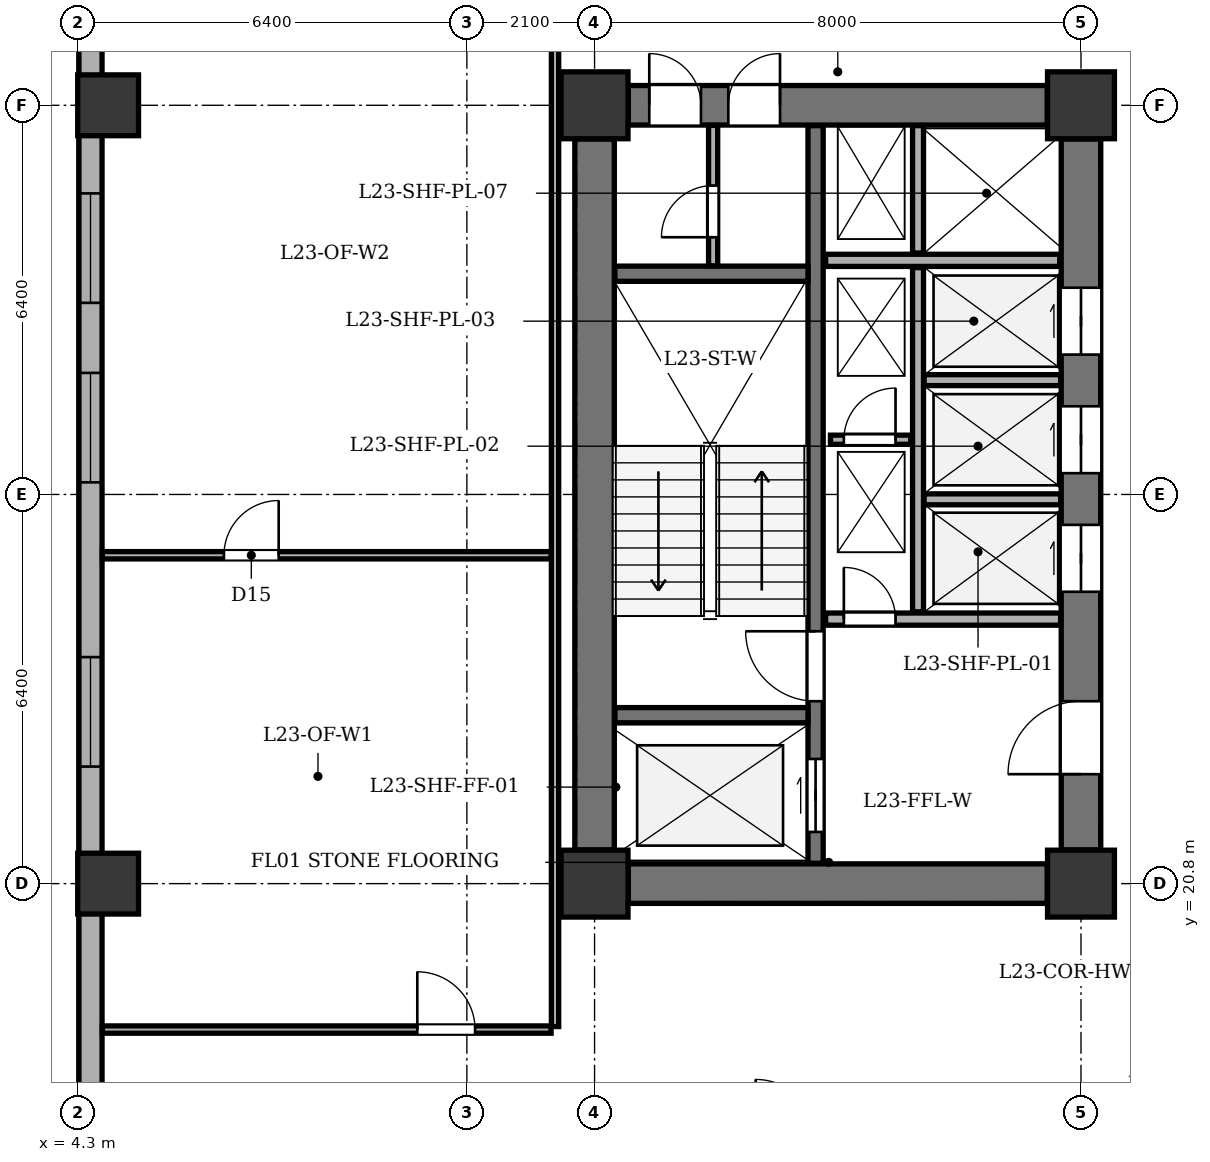
"""IFC4 building model, lengths in metres.
Left out: names, types, materials, properties, quantities, classifications, styles, units other than length and angle.
Written with IfcOpenShell. Run it as: python <this file> out.ifc"""

import sys

from ifc_helpers import new_model, si_unit, direction, frame, frame_2d, origin, origin_2d, place, context, subcontext, project, spatial, rectangle, extrude, element, fill, save


model = new_model("IFC4")
c1 = context("Model", 3, precision=1e-05, world=origin(), true_north=direction((0.0, 1.0)))
c2 = subcontext(c1, "Body", "Model", "MODEL_VIEW")
j1 = project(units=[si_unit("LENGTHUNIT", "METRE"), si_unit("PLANEANGLEUNIT", "RADIAN")], contexts=[c1])
p1 = place(None, origin())
s1 = spatial("IfcSite", under=j1, at=p1, CompositionType="ELEMENT")
p2 = place(p1, origin())
s2 = spatial("IfcBuilding", under=s1, at=p2, CompositionType="ELEMENT")
p3 = place(p2, frame((0.0, 0.0, 94.5)))
s3 = spatial("IfcBuildingStorey", under=s2, at=p3, CompositionType="ELEMENT", Elevation=94.5)
for number, where, z_axis, x_axis in (
    (1, (12.8, 20.8, 0.0), (0.0, 0.0, 1.0), (1.0, 0.0, 0.0)),
    (2, (20.8, 20.8, 0.0), (0.0, 0.0, 1.0), (1.0, 0.0, 0.0)),
    (3, (12.8, 33.6, 0.0), (0.0, 0.0, 1.0), (1.0, 0.0, 0.0)),
    (4, (20.8, 33.6, 0.0), (0.0, 0.0, 1.0), (1.0, 0.0, 0.0)),
):
    element("IfcColumn", number, at=place(p3, frame(where, z_axis=z_axis, x_axis=x_axis)), inside=s3, PredefinedType="COLUMN", context=c2, shape_type="SweptSolid", body=[
        extrude(rectangle(XDim=1.1, YDim=1.1, at=origin_2d()), origin(), (0.0, 0.0, 1.0), 3.9),
    ])
for number, where, z_axis, x_axis in (
    (5, (4.8, 20.8, 0.0), (0.0, 0.0, 1.0), (1.0, 0.0, 0.0)),
    (6, (4.8, 33.6, 0.0), (0.0, 0.0, 1.0), (1.0, 0.0, 0.0)),
):
    element("IfcColumn", number, at=place(p3, frame(where, z_axis=z_axis, x_axis=x_axis)), inside=s3, PredefinedType="COLUMN", context=c2, shape_type="SweptSolid", body=[
        extrude(rectangle(XDim=1.0, YDim=1.0, at=origin_2d()), origin(), (0.0, 0.0, 1.0), 3.9),
    ])
p4 = place(p3, frame((4.51, 12.9, 0.0), z_axis=(0.0, 0.0, 1.0), x_axis=(0.0, 1.0, 0.0)))
e7 = element("IfcWall", 7, at=p4, inside=s3, PredefinedType="STANDARD", context=c2, shape_type="SweptSolid", body=[
    extrude(rectangle(XDim=35.0, YDim=0.38, at=frame_2d((17.5, 0.0))), origin(), (0.0, 0.0, 1.0), 3.135),
])
p5 = place(p4, frame((2.025, 0.0, 0.8)))
e8 = element("IfcOpeningElement", 8, at=p5, cuts=e7, PredefinedType="OPENING", context=c2, shape_type="SweptSolid", body=[
    extrude(rectangle(XDim=1.8, YDim=1.9, at=frame_2d((0.9, 0.95))), frame((0.0, 0.2, 0.0), z_axis=(0.0, -1.0, 0.0), x_axis=(1.0, 0.0, 0.0)), (0.0, 0.0, 1.0), 0.4),
])
p6 = place(p4, frame((9.825, 0.0, 0.8)))
e9 = element("IfcOpeningElement", 9, at=p6, cuts=e7, PredefinedType="OPENING", context=c2, shape_type="SweptSolid", body=[
    extrude(rectangle(XDim=1.8, YDim=1.9, at=frame_2d((0.9, 0.95))), frame((0.0, 0.2, 0.0), z_axis=(0.0, -1.0, 0.0), x_axis=(1.0, 0.0, 0.0)), (0.0, 0.0, 1.0), 0.4),
])
p7 = place(p4, frame((14.499, 0.0, 0.8)))
e10 = element("IfcOpeningElement", 10, at=p7, cuts=e7, PredefinedType="OPENING", context=c2, shape_type="SweptSolid", body=[
    extrude(rectangle(XDim=1.8, YDim=1.9, at=frame_2d((0.9, 0.95))), frame((0.0, 0.2, 0.0), z_axis=(0.0, -1.0, 0.0), x_axis=(1.0, 0.0, 0.0)), (0.0, 0.0, 1.0), 0.4),
])
p8 = place(p4, frame((17.451, 0.0, 0.8)))
e11 = element("IfcOpeningElement", 11, at=p8, cuts=e7, PredefinedType="OPENING", context=c2, shape_type="SweptSolid", body=[
    extrude(rectangle(XDim=1.8, YDim=1.9, at=frame_2d((0.9, 0.95))), frame((0.0, 0.2, 0.0), z_axis=(0.0, -1.0, 0.0), x_axis=(1.0, 0.0, 0.0)), (0.0, 0.0, 1.0), 0.4),
])
p9 = place(p4, frame((25.443, 0.0, 0.8)))
e12 = element("IfcOpeningElement", 12, at=p9, cuts=e7, PredefinedType="OPENING", context=c2, shape_type="SweptSolid", body=[
    extrude(rectangle(XDim=1.8, YDim=1.9, at=frame_2d((0.9, 0.95))), frame((0.0, 0.2, 0.0), z_axis=(0.0, -1.0, 0.0), x_axis=(1.0, 0.0, 0.0)), (0.0, 0.0, 1.0), 0.4),
])
p10 = place(p4, frame((30.207, 0.0, 0.8)))
e13 = element("IfcOpeningElement", 13, at=p10, cuts=e7, PredefinedType="OPENING", context=c2, shape_type="SweptSolid", body=[
    extrude(rectangle(XDim=2.4, YDim=1.9, at=frame_2d((1.2, 0.95))), frame((0.0, 0.2, 0.0), z_axis=(0.0, -1.0, 0.0), x_axis=(1.0, 0.0, 0.0)), (0.0, 0.0, 1.0), 0.4),
])
p11 = place(p3, frame((12.8, 21.355, 0.0), z_axis=(0.0, 0.0, 1.0), x_axis=(0.0, 1.0, 0.0)))
e14 = element("IfcWall", 14, at=p11, inside=s3, PredefinedType="SHEAR", context=c2, shape_type="SweptSolid", body=[
    extrude(rectangle(XDim=11.69, YDim=0.65, at=frame_2d((5.845, 0.0))), origin(), (0.0, 0.0, 1.0), 3.6),
])
p12 = place(p3, frame((13.355, 20.8, 0.0), z_axis=(0.0, 0.0, 1.0), x_axis=(1.0, 0.0, 0.0)))
e15 = element("IfcWall", 15, at=p12, inside=s3, PredefinedType="SHEAR", context=c2, shape_type="SweptSolid", body=[
    extrude(rectangle(XDim=6.89, YDim=0.65, at=frame_2d((3.445, 0.0))), origin(), (0.0, 0.0, 1.0), 3.6),
])
p13 = place(p3, frame((13.355, 33.6, 0.0), z_axis=(0.0, 0.0, 1.0), x_axis=(1.0, 0.0, 0.0)))
e16 = element("IfcWall", 16, at=p13, inside=s3, PredefinedType="SHEAR", context=c2, shape_type="SweptSolid", body=[
    extrude(rectangle(XDim=6.89, YDim=0.65, at=frame_2d((3.445, 0.0))), origin(), (0.0, 0.0, 1.0), 3.6),
])
p14 = place(p13, frame((0.345, 0.0, 0.0)))
e17 = element("IfcOpeningElement", 17, at=p14, cuts=e16, PredefinedType="OPENING", context=c2, shape_type="SweptSolid", body=[
    extrude(rectangle(XDim=0.85, YDim=2.02, at=frame_2d((0.425, 1.01))), frame((0.0, 0.335, 0.0), z_axis=(0.0, -1.0, 0.0), x_axis=(1.0, 0.0, 0.0)), (0.0, 0.0, 1.0), 0.67),
])
p15 = place(p13, frame((1.645, 0.0, 0.0)))
e18 = element("IfcOpeningElement", 18, at=p15, cuts=e16, PredefinedType="OPENING", context=c2, shape_type="SweptSolid", body=[
    extrude(rectangle(XDim=0.85, YDim=2.02, at=frame_2d((0.425, 1.01))), frame((0.0, 0.335, 0.0), z_axis=(0.0, -1.0, 0.0), x_axis=(1.0, 0.0, 0.0)), (0.0, 0.0, 1.0), 0.67),
])
p16 = place(p3, frame((20.8, 21.355, 0.0), z_axis=(0.0, 0.0, 1.0), x_axis=(0.0, 1.0, 0.0)))
e19 = element("IfcWall", 19, at=p16, inside=s3, PredefinedType="SHEAR", context=c2, shape_type="SweptSolid", body=[
    extrude(rectangle(XDim=11.69, YDim=0.65, at=frame_2d((5.845, 0.0))), origin(), (0.0, 0.0, 1.0), 3.6),
])
p17 = place(p16, frame((1.245, 0.0, 0.0)))
e20 = element("IfcOpeningElement", 20, at=p17, cuts=e19, PredefinedType="OPENING", context=c2, shape_type="SweptSolid", body=[
    extrude(rectangle(XDim=1.2, YDim=2.15, at=frame_2d((0.6, 1.075))), frame((0.0, 0.335, 0.0), z_axis=(0.0, -1.0, 0.0), x_axis=(1.0, 0.0, 0.0)), (0.0, 0.0, 1.0), 0.67),
])
p18 = place(p16, frame((4.245, 0.0, 0.0)))
e21 = element("IfcOpeningElement", 21, at=p18, cuts=e19, PredefinedType="OPENING", context=c2, shape_type="SweptSolid", body=[
    extrude(rectangle(XDim=1.1, YDim=2.1, at=frame_2d((0.55, 1.05))), frame((0.0, 0.335, 0.0), z_axis=(0.0, -1.0, 0.0), x_axis=(1.0, 0.0, 0.0)), (0.0, 0.0, 1.0), 0.67),
])
p19 = place(p16, frame((6.195, 0.0, 0.0)))
e22 = element("IfcOpeningElement", 22, at=p19, cuts=e19, PredefinedType="OPENING", context=c2, shape_type="SweptSolid", body=[
    extrude(rectangle(XDim=1.1, YDim=2.1, at=frame_2d((0.55, 1.05))), frame((0.0, 0.335, 0.0), z_axis=(0.0, -1.0, 0.0), x_axis=(1.0, 0.0, 0.0)), (0.0, 0.0, 1.0), 0.67),
])
p20 = place(p16, frame((8.145, 0.0, 0.0)))
e23 = element("IfcOpeningElement", 23, at=p20, cuts=e19, PredefinedType="OPENING", context=c2, shape_type="SweptSolid", body=[
    extrude(rectangle(XDim=1.1, YDim=2.1, at=frame_2d((0.55, 1.05))), frame((0.0, 0.335, 0.0), z_axis=(0.0, -1.0, 0.0), x_axis=(1.0, 0.0, 0.0)), (0.0, 0.0, 1.0), 0.67),
])
p21 = place(p3, frame((16.435, 21.135, 0.0), z_axis=(0.0, 0.0, 1.0), x_axis=(0.0, 1.0, 0.0)))
e24 = element("IfcWall", 24, at=p21, inside=s3, PredefinedType="SHEAR", context=c2, shape_type="SweptSolid", body=[
    extrude(rectangle(XDim=12.13, YDim=0.25, at=frame_2d((6.065, 0.0))), origin(), (0.0, 0.0, 1.0), 3.6),
])
p22 = place(p21, frame((0.515, 0.0, 0.0)))
e25 = element("IfcOpeningElement", 25, at=p22, cuts=e24, PredefinedType="OPENING", context=c2, shape_type="SweptSolid", body=[
    extrude(rectangle(XDim=1.2, YDim=2.15, at=frame_2d((0.6, 1.075))), frame((0.0, 0.135, 0.0), z_axis=(0.0, -1.0, 0.0), x_axis=(1.0, 0.0, 0.0)), (0.0, 0.0, 1.0), 0.27),
])
p23 = place(p21, frame((2.665, 0.0, 0.0)))
e26 = element("IfcOpeningElement", 26, at=p23, cuts=e24, PredefinedType="OPENING", context=c2, shape_type="SweptSolid", body=[
    extrude(rectangle(XDim=1.15, YDim=2.15, at=frame_2d((0.575, 1.075))), frame((0.0, 0.135, 0.0), z_axis=(0.0, -1.0, 0.0), x_axis=(1.0, 0.0, 0.0)), (0.0, 0.0, 1.0), 0.27),
])
for number, where, z_axis, x_axis in (
    (27, (13.135, 23.57, 0.0), (0.0, 0.0, 1.0), (1.0, 0.0, 0.0)),
    (28, (13.135, 30.83, 0.0), (0.0, 0.0, 1.0), (1.0, 0.0, 0.0)),
):
    element("IfcWall", number, at=place(p3, frame(where, z_axis=z_axis, x_axis=x_axis)), inside=s3, PredefinedType="SHEAR", context=c2, shape_type="SweptSolid", body=[
        extrude(rectangle(XDim=3.175, YDim=0.25, at=frame_2d((1.587, 0.0))), origin(), (0.0, 0.0, 1.0), 3.6),
    ])
p24 = place(p3, frame((16.6, 25.15, 0.0), z_axis=(0.0, 0.0, 1.0), x_axis=(1.0, 0.0, 0.0)))
e29 = element("IfcWall", 29, at=p24, inside=s3, PredefinedType="SOLIDWALL", context=c2, shape_type="SweptSolid", body=[
    extrude(rectangle(XDim=3.865, YDim=0.2, at=frame_2d((1.933, 0.0))), origin(), (0.0, 0.0, 1.0), 3.6),
])
p25 = place(p24, frame((0.3, 0.0, 0.0)))
e30 = element("IfcOpeningElement", 30, at=p25, cuts=e29, PredefinedType="OPENING", context=c2, shape_type="SweptSolid", body=[
    extrude(rectangle(XDim=0.85, YDim=2.02, at=frame_2d((0.425, 1.01))), frame((0.0, 0.11, 0.0), z_axis=(0.0, -1.0, 0.0), x_axis=(1.0, 0.0, 0.0)), (0.0, 0.0, 1.0), 0.22),
])
p26 = place(p3, frame((16.6, 31.05, 0.0), z_axis=(0.0, 0.0, 1.0), x_axis=(1.0, 0.0, 0.0)))
e31 = element("IfcWall", 31, at=p26, inside=s3, PredefinedType="SOLIDWALL", context=c2, shape_type="SweptSolid", body=[
    extrude(rectangle(XDim=3.85, YDim=0.2, at=frame_2d((1.925, 0.0))), origin(), (0.0, 0.0, 1.0), 3.6),
])
p27 = place(p3, frame((18.12, 25.27, 0.0), z_axis=(0.0, 0.0, 1.0), x_axis=(0.0, 1.0, 0.0)))
e32 = element("IfcWall", 32, at=p27, inside=s3, PredefinedType="PARTITIONING", context=c2, shape_type="SweptSolid", body=[
    extrude(rectangle(XDim=5.66, YDim=0.18, at=frame_2d((2.83, 0.0))), origin(), (0.0, 0.0, 1.0), 3.6),
])
p28 = place(p3, frame((18.12, 31.17, 0.0), z_axis=(0.0, 0.0, 1.0), x_axis=(0.0, 1.0, 0.0)))
e33 = element("IfcWall", 33, at=p28, inside=s3, PredefinedType="PARTITIONING", context=c2, shape_type="SweptSolid", body=[
    extrude(rectangle(XDim=2.095, YDim=0.18, at=frame_2d((1.047, 0.0))), origin(), (0.0, 0.0, 1.0), 3.6),
])
for number, where, z_axis, x_axis in (
    (34, (18.22, 27.12, 0.0), (0.0, 0.0, 1.0), (1.0, 0.0, 0.0)),
    (35, (18.22, 29.08, 0.0), (0.0, 0.0, 1.0), (1.0, 0.0, 0.0)),
):
    element("IfcWall", number, at=place(p3, frame(where, z_axis=z_axis, x_axis=x_axis)), inside=s3, PredefinedType="PARTITIONING", context=c2, shape_type="SweptSolid", body=[
        extrude(rectangle(XDim=2.245, YDim=0.18, at=frame_2d((1.123, 0.0))), origin(), (0.0, 0.0, 1.0), 3.6),
    ])
p29 = place(p3, frame((14.75, 30.96, 0.0), z_axis=(0.0, 0.0, 1.0), x_axis=(0.0, 1.0, 0.0)))
e36 = element("IfcWall", 36, at=p29, inside=s3, PredefinedType="PARTITIONING", context=c2, shape_type="SweptSolid", body=[
    extrude(rectangle(XDim=2.31, YDim=0.15, at=frame_2d((1.155, 0.0))), origin(), (0.0, 0.0, 1.0), 3.6),
])
p30 = place(p29, frame((0.47, 0.0, 0.0)))
e37 = element("IfcOpeningElement", 37, at=p30, cuts=e36, PredefinedType="OPENING", context=c2, shape_type="SweptSolid", body=[
    extrude(rectangle(XDim=0.85, YDim=2.02, at=frame_2d((0.425, 1.01))), frame((0.0, 0.085, 0.0), z_axis=(0.0, -1.0, 0.0), x_axis=(1.0, 0.0, 0.0)), (0.0, 0.0, 1.0), 0.17),
])
p31 = place(p3, frame((16.68, 28.1, 0.0), z_axis=(0.0, 0.0, 1.0), x_axis=(1.0, 0.0, 0.0)))
e38 = element("IfcWall", 38, at=p31, inside=s3, PredefinedType="PARTITIONING", context=c2, shape_type="SweptSolid", body=[
    extrude(rectangle(XDim=1.32, YDim=0.15, at=frame_2d((0.66, 0.0))), origin(), (0.0, 0.0, 1.0), 3.6),
])
p32 = place(p31, frame((0.22, 0.0, 0.0)))
e39 = element("IfcOpeningElement", 39, at=p32, cuts=e38, PredefinedType="OPENING", context=c2, shape_type="SweptSolid", body=[
    extrude(rectangle(XDim=0.85, YDim=2.02, at=frame_2d((0.425, 1.01))), frame((0.0, 0.085, 0.0), z_axis=(0.0, -1.0, 0.0), x_axis=(1.0, 0.0, 0.0)), (0.0, 0.0, 1.0), 0.17),
])
p33 = place(p3, frame((12.15, 18.45, 0.0), z_axis=(0.0, 0.0, 1.0), x_axis=(0.0, 1.0, 0.0)))
e40 = element("IfcWall", 40, at=p33, inside=s3, PredefinedType="PARTITIONING", context=c2, shape_type="SweptSolid", body=[
    extrude(rectangle(XDim=17.5, YDim=0.12, at=frame_2d((8.75, 0.0))), origin(), (0.0, 0.0, 1.0), 3.6),
])
p34 = place(p3, frame((4.705, 18.4, 0.0), z_axis=(0.0, 0.0, 1.0), x_axis=(1.0, 0.0, 0.0)))
e41 = element("IfcWall", 41, at=p34, inside=s3, PredefinedType="PARTITIONING", context=c2, shape_type="SweptSolid", body=[
    extrude(rectangle(XDim=7.38, YDim=0.12, at=frame_2d((3.69, 0.0))), origin(), (0.0, 0.0, 1.0), 3.6),
])
p35 = place(p34, frame((5.18, 0.0, 0.0)))
e42 = element("IfcOpeningElement", 42, at=p35, cuts=e41, PredefinedType="OPENING", context=c2, shape_type="SweptSolid", body=[
    extrude(rectangle(XDim=0.95, YDim=2.1, at=frame_2d((0.475, 1.05))), frame((0.0, 0.07, 0.0), z_axis=(0.0, -1.0, 0.0), x_axis=(1.0, 0.0, 0.0)), (0.0, 0.0, 1.0), 0.14),
])
p36 = place(p3, frame((4.705, 26.2, 0.0), z_axis=(0.0, 0.0, 1.0), x_axis=(1.0, 0.0, 0.0)))
e43 = element("IfcWall", 43, at=p36, inside=s3, PredefinedType="PARTITIONING", context=c2, shape_type="SweptSolid", body=[
    extrude(rectangle(XDim=7.38, YDim=0.12, at=frame_2d((3.69, 0.0))), origin(), (0.0, 0.0, 1.0), 3.6),
])
p37 = place(p36, frame((2.0, 0.0, 0.0)))
e44 = element("IfcOpeningElement", 44, at=p37, cuts=e43, PredefinedType="OPENING", context=c2, shape_type="SweptSolid", body=[
    extrude(rectangle(XDim=0.9, YDim=2.05, at=frame_2d((0.45, 1.025))), frame((0.0, 0.07, 0.0), z_axis=(0.0, -1.0, 0.0), x_axis=(1.0, 0.0, 0.0)), (0.0, 0.0, 1.0), 0.14),
])
p38 = place(p6, origin())
e45 = element("IfcWindow", 45, at=p38, inside=s3, PartitioningType="SINGLE_PANEL", PredefinedType="WINDOW", context=c2, shape_type="SweptSolid", body=[
    extrude(rectangle(XDim=1.8, YDim=1.9, at=frame_2d((0.9, 0.95))), frame((0.0, -0.01, 0.0), z_axis=(0.0, -1.0, 0.0), x_axis=(1.0, 0.0, 0.0)), (0.0, 0.0, 1.0), 0.06),
])
fill(e9, e45)
p39 = place(p7, origin())
e46 = element("IfcWindow", 46, at=p39, inside=s3, PartitioningType="SINGLE_PANEL", PredefinedType="WINDOW", context=c2, shape_type="SweptSolid", body=[
    extrude(rectangle(XDim=1.8, YDim=1.9, at=frame_2d((0.9, 0.95))), frame((0.0, -0.01, 0.0), z_axis=(0.0, -1.0, 0.0), x_axis=(1.0, 0.0, 0.0)), (0.0, 0.0, 1.0), 0.06),
])
fill(e10, e46)
p40 = place(p8, origin())
e47 = element("IfcWindow", 47, at=p40, inside=s3, PartitioningType="SINGLE_PANEL", PredefinedType="WINDOW", context=c2, shape_type="SweptSolid", body=[
    extrude(rectangle(XDim=1.8, YDim=1.9, at=frame_2d((0.9, 0.95))), frame((0.0, -0.01, 0.0), z_axis=(0.0, -1.0, 0.0), x_axis=(1.0, 0.0, 0.0)), (0.0, 0.0, 1.0), 0.06),
])
fill(e11, e47)
p41 = place(p14, origin())
e48 = element("IfcDoor", 48, at=p41, inside=s3, OperationType="SINGLE_SWING_LEFT", PredefinedType="DOOR", context=c2, shape_type="SweptSolid", body=[
    extrude(rectangle(XDim=0.85, YDim=2.02, at=frame_2d((0.425, 1.01))), frame((0.0, 0.025, 0.0), z_axis=(0.0, -1.0, 0.0), x_axis=(1.0, 0.0, 0.0)), (0.0, 0.0, 1.0), 0.05),
])
fill(e17, e48)
p42 = place(p15, origin())
e49 = element("IfcDoor", 49, at=p42, inside=s3, OperationType="SINGLE_SWING_RIGHT", PredefinedType="DOOR", context=c2, shape_type="SweptSolid", body=[
    extrude(rectangle(XDim=0.85, YDim=2.02, at=frame_2d((0.425, 1.01))), frame((0.0, 0.025, 0.0), z_axis=(0.0, -1.0, 0.0), x_axis=(1.0, 0.0, 0.0)), (0.0, 0.0, 1.0), 0.05),
])
fill(e18, e49)
p43 = place(p17, origin())
e50 = element("IfcDoor", 50, at=p43, inside=s3, OperationType="SINGLE_SWING_LEFT", PredefinedType="DOOR", context=c2, shape_type="SweptSolid", body=[
    extrude(rectangle(XDim=1.2, YDim=2.15, at=frame_2d((0.6, 1.075))), frame((0.0, 0.025, 0.0), z_axis=(0.0, -1.0, 0.0), x_axis=(1.0, 0.0, 0.0)), (0.0, 0.0, 1.0), 0.05),
])
fill(e20, e50)
p44 = place(p18, origin())
e51 = element("IfcDoor", 51, at=p44, inside=s3, OperationType="DOUBLE_DOOR_SLIDING", PredefinedType="DOOR", context=c2, shape_type="SweptSolid", body=[
    extrude(rectangle(XDim=1.1, YDim=2.1, at=frame_2d((0.55, 1.05))), frame((0.0, 0.025, 0.0), z_axis=(0.0, -1.0, 0.0), x_axis=(1.0, 0.0, 0.0)), (0.0, 0.0, 1.0), 0.05),
])
fill(e21, e51)
p45 = place(p19, origin())
e52 = element("IfcDoor", 52, at=p45, inside=s3, OperationType="DOUBLE_DOOR_SLIDING", PredefinedType="DOOR", context=c2, shape_type="SweptSolid", body=[
    extrude(rectangle(XDim=1.1, YDim=2.1, at=frame_2d((0.55, 1.05))), frame((0.0, 0.025, 0.0), z_axis=(0.0, -1.0, 0.0), x_axis=(1.0, 0.0, 0.0)), (0.0, 0.0, 1.0), 0.05),
])
fill(e22, e52)
p46 = place(p20, origin())
e53 = element("IfcDoor", 53, at=p46, inside=s3, OperationType="DOUBLE_DOOR_SLIDING", PredefinedType="DOOR", context=c2, shape_type="SweptSolid", body=[
    extrude(rectangle(XDim=1.1, YDim=2.1, at=frame_2d((0.55, 1.05))), frame((0.0, 0.025, 0.0), z_axis=(0.0, -1.0, 0.0), x_axis=(1.0, 0.0, 0.0)), (0.0, 0.0, 1.0), 0.05),
])
fill(e23, e53)
p47 = place(p22, origin())
e54 = element("IfcDoor", 54, at=p47, inside=s3, OperationType="DOUBLE_DOOR_SLIDING", PredefinedType="DOOR", context=c2, shape_type="SweptSolid", body=[
    extrude(rectangle(XDim=1.2, YDim=2.15, at=frame_2d((0.6, 1.075))), frame((0.0, 0.025, 0.0), z_axis=(0.0, -1.0, 0.0), x_axis=(1.0, 0.0, 0.0)), (0.0, 0.0, 1.0), 0.05),
])
fill(e25, e54)
p48 = place(p23, origin())
e55 = element("IfcDoor", 55, at=p48, inside=s3, OperationType="SINGLE_SWING_RIGHT", PredefinedType="DOOR", context=c2, shape_type="SweptSolid", body=[
    extrude(rectangle(XDim=1.15, YDim=2.15, at=frame_2d((0.575, 1.075))), frame((0.0, 0.025, 0.0), z_axis=(0.0, -1.0, 0.0), x_axis=(1.0, 0.0, 0.0)), (0.0, 0.0, 1.0), 0.05),
])
fill(e26, e55)
p49 = place(p25, origin())
e56 = element("IfcDoor", 56, at=p49, inside=s3, OperationType="SINGLE_SWING_LEFT", PredefinedType="DOOR", context=c2, shape_type="SweptSolid", body=[
    extrude(rectangle(XDim=0.85, YDim=2.02, at=frame_2d((0.425, 1.01))), frame((0.0, 0.025, 0.0), z_axis=(0.0, -1.0, 0.0), x_axis=(1.0, 0.0, 0.0)), (0.0, 0.0, 1.0), 0.05),
])
fill(e30, e56)
p50 = place(p30, origin())
e57 = element("IfcDoor", 57, at=p50, inside=s3, OperationType="SINGLE_SWING_LEFT", PredefinedType="DOOR", context=c2, shape_type="SweptSolid", body=[
    extrude(rectangle(XDim=0.85, YDim=2.02, at=frame_2d((0.425, 1.01))), frame((0.0, 0.025, 0.0), z_axis=(0.0, -1.0, 0.0), x_axis=(1.0, 0.0, 0.0)), (0.0, 0.0, 1.0), 0.05),
])
fill(e37, e57)
p51 = place(p32, origin())
e58 = element("IfcDoor", 58, at=p51, inside=s3, OperationType="SINGLE_SWING_RIGHT", PredefinedType="DOOR", context=c2, shape_type="SweptSolid", body=[
    extrude(rectangle(XDim=0.85, YDim=2.02, at=frame_2d((0.425, 1.01))), frame((0.0, 0.025, 0.0), z_axis=(0.0, -1.0, 0.0), x_axis=(1.0, 0.0, 0.0)), (0.0, 0.0, 1.0), 0.05),
])
fill(e39, e58)
p52 = place(p37, origin())
e59 = element("IfcDoor", 59, at=p52, inside=s3, OperationType="SINGLE_SWING_RIGHT", PredefinedType="DOOR", context=c2, shape_type="SweptSolid", body=[
    extrude(rectangle(XDim=0.9, YDim=2.05, at=frame_2d((0.45, 1.025))), frame((0.0, 0.025, 0.0), z_axis=(0.0, -1.0, 0.0), x_axis=(1.0, 0.0, 0.0)), (0.0, 0.0, 1.0), 0.05),
])
fill(e44, e59)
p53 = place(p35, origin())
e60 = element("IfcDoor", 60, at=p53, inside=s3, OperationType="SINGLE_SWING_LEFT", PredefinedType="DOOR", context=c2, shape_type="SweptSolid", body=[
    extrude(rectangle(XDim=0.95, YDim=2.1, at=frame_2d((0.475, 1.05))), frame((0.0, 0.025, 0.0), z_axis=(0.0, -1.0, 0.0), x_axis=(1.0, 0.0, 0.0)), (0.0, 0.0, 1.0), 0.05),
])
fill(e42, e60)
save(model, sys.argv[1])
